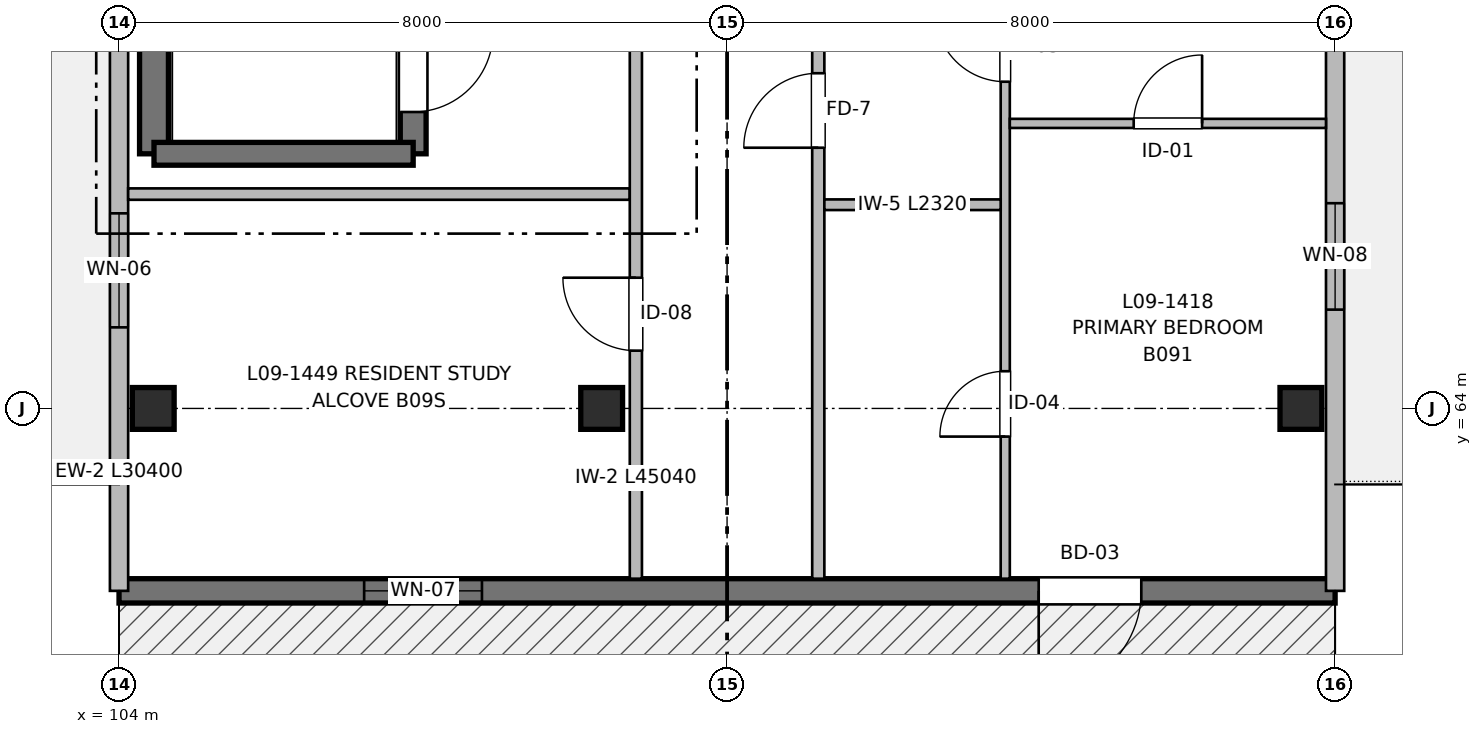
"""IFC4 building model, lengths in metres.
Left out: names, types, materials, properties, quantities, classifications, styles, units other than length and angle.
Written with IfcOpenShell. Run it as: python <this file> out.ifc"""

import sys

from ifc_helpers import new_model, si_unit, direction, frame, frame_2d, origin, origin_2d, place, context, subcontext, project, spatial, rectangle, extrude, element, fill, save


model = new_model("IFC4")
c1 = context("Model", 3, precision=1e-05, world=origin(), true_north=direction((0.0, 1.0)))
c2 = subcontext(c1, "Body", "Model", "MODEL_VIEW")
j1 = project(units=[si_unit("LENGTHUNIT", "METRE"), si_unit("PLANEANGLEUNIT", "RADIAN")], contexts=[c1])
p1 = place(None, origin())
s1 = spatial("IfcSite", under=j1, at=p1, CompositionType="ELEMENT")
p2 = place(p1, origin())
s2 = spatial("IfcBuilding", under=s1, at=p2, CompositionType="ELEMENT")
p3 = place(p2, frame((0.0, 0.0, 29.76)))
s3 = spatial("IfcBuildingStorey", under=s2, at=p3, CompositionType="ELEMENT", Elevation=29.76)
for number, where, z_axis, x_axis in (
    (1, (104.45, 64.0, 0.0), (0.0, 0.0, 1.0), (1.0, 0.0, 0.0)),
    (2, (110.35, 64.0, 0.0), (0.0, 0.0, 1.0), (1.0, 0.0, 0.0)),
    (3, (119.55, 64.0, 0.0), (0.0, 0.0, 1.0), (1.0, 0.0, 0.0)),
):
    element("IfcColumn", number, at=place(p3, frame(where, z_axis=z_axis, x_axis=x_axis)), inside=s3, PredefinedType="COLUMN", context=c2, shape_type="SweptSolid", body=[
        extrude(rectangle(XDim=0.55, YDim=0.55, at=origin_2d()), origin(), (0.0, 0.0, 1.0), 3.2),
    ])
p4 = place(p3, frame((104.46, 67.35, 0.0), z_axis=(0.0, 0.0, 1.0), x_axis=(0.0, 1.0, 0.0)))
e4 = element("IfcWall", 4, at=p4, inside=s3, PredefinedType="SHEAR", context=c2, shape_type="SweptSolid", body=[
    extrude(rectangle(XDim=12.45, YDim=0.38, at=frame_2d((6.225, 0.0))), origin(), (0.0, 0.0, 1.0), 3.2),
])
p5 = place(p4, frame((2.2, 0.0, 0.97)))
e5 = element("IfcOpeningElement", 5, at=p5, cuts=e4, PredefinedType="OPENING", context=c2, shape_type="SweptSolid", body=[
    extrude(rectangle(XDim=0.95, YDim=1.25, at=frame_2d((0.475, 0.625))), frame((0.0, 0.2, 0.0), z_axis=(0.0, -1.0, 0.0), x_axis=(1.0, 0.0, 0.0)), (0.0, 0.0, 1.0), 0.4),
])
p6 = place(p3, frame((107.87, 79.8, 0.0), z_axis=(0.0, 0.0, 1.0), x_axis=(0.0, -1.0, 0.0)))
e6 = element("IfcWall", 6, at=p6, inside=s3, PredefinedType="SHEAR", context=c2, shape_type="SweptSolid", body=[
    extrude(rectangle(XDim=12.45, YDim=0.34, at=frame_2d((6.225, 0.0))), origin(), (0.0, 0.0, 1.0), 3.2),
])
p7 = place(p6, frame((10.85, 0.0, 0.0)))
e7 = element("IfcOpeningElement", 7, at=p7, cuts=e6, PredefinedType="OPENING", context=c2, shape_type="SweptSolid", body=[
    extrude(rectangle(XDim=1.05, YDim=2.15, at=frame_2d((0.525, 1.075))), frame((0.0, 0.18, 0.0), z_axis=(0.0, -1.0, 0.0), x_axis=(1.0, 0.0, 0.0)), (0.0, 0.0, 1.0), 0.36),
])
p8 = place(p3, frame((107.87, 67.35, 0.0), z_axis=(0.0, 0.0, 1.0), x_axis=(-1.0, 0.0, 0.0)))
e8 = element("IfcWall", 8, at=p8, inside=s3, PredefinedType="SHEAR", context=c2, shape_type="SweptSolid", body=[
    extrude(rectangle(XDim=3.41, YDim=0.3, at=frame_2d((1.705, 0.0))), origin(), (0.0, 0.0, 1.0), 3.2),
])
p9 = place(p3, frame((120.0, 61.6, 0.0), z_axis=(0.0, 0.0, 1.0), x_axis=(-1.0, 0.0, 0.0)))
e9 = element("IfcWall", 9, at=p9, inside=s3, PredefinedType="SHEAR", context=c2, shape_type="SweptSolid", body=[
    extrude(rectangle(XDim=16.0, YDim=0.32, at=frame_2d((8.0, 0.0))), origin(), (0.0, 0.0, 1.0), 2.98),
])
p10 = place(p9, frame((2.55, 0.0, 0.0)))
e10 = element("IfcOpeningElement", 10, at=p10, cuts=e9, PredefinedType="OPENING", context=c2, shape_type="SweptSolid", body=[
    extrude(rectangle(XDim=1.35, YDim=2.2, at=frame_2d((0.675, 1.1))), frame((0.0, 0.17, 0.0), z_axis=(0.0, -1.0, 0.0), x_axis=(1.0, 0.0, 0.0)), (0.0, 0.0, 1.0), 0.34),
])
p11 = place(p9, frame((11.225, 0.0, 0.82)))
e11 = element("IfcOpeningElement", 11, at=p11, cuts=e9, PredefinedType="OPENING", context=c2, shape_type="SweptSolid", body=[
    extrude(rectangle(XDim=1.55, YDim=1.4, at=frame_2d((0.775, 0.7))), frame((0.0, 0.17, 0.0), z_axis=(0.0, -1.0, 0.0), x_axis=(1.0, 0.0, 0.0)), (0.0, 0.0, 1.0), 0.34),
])
p12 = place(p3, frame((120.0, 88.0, 0.0), z_axis=(0.0, 0.0, 1.0), x_axis=(0.0, -1.0, 0.0)))
e12 = element("IfcWall", 12, at=p12, inside=s3, PredefinedType="SOLIDWALL", context=c2, shape_type="SweptSolid", body=[
    extrude(rectangle(XDim=26.4, YDim=0.24, at=frame_2d((13.2, 0.0))), origin(), (0.0, 0.0, 1.0), 2.98),
])
p13 = place(p12, frame((3.8, 0.0, 0.0)))
e13 = element("IfcOpeningElement", 13, at=p13, cuts=e12, PredefinedType="OPENING", context=c2, shape_type="SweptSolid", body=[
    extrude(rectangle(XDim=1.2, YDim=2.2, at=frame_2d((0.6, 1.1))), frame((0.0, 0.13, 0.0), z_axis=(0.0, -1.0, 0.0), x_axis=(1.0, 0.0, 0.0)), (0.0, 0.0, 1.0), 0.26),
])
p14 = place(p12, frame((8.7, 0.0, 0.57)))
e14 = element("IfcOpeningElement", 14, at=p14, cuts=e12, PredefinedType="OPENING", context=c2, shape_type="SweptSolid", body=[
    extrude(rectangle(XDim=2.3, YDim=1.65, at=frame_2d((1.15, 0.825))), frame((0.0, 0.13, 0.0), z_axis=(0.0, -1.0, 0.0), x_axis=(1.0, 0.0, 0.0)), (0.0, 0.0, 1.0), 0.26),
])
p15 = place(p12, frame((12.425, 0.0, 0.82)))
e15 = element("IfcOpeningElement", 15, at=p15, cuts=e12, PredefinedType="OPENING", context=c2, shape_type="SweptSolid", body=[
    extrude(rectangle(XDim=1.55, YDim=1.4, at=frame_2d((0.775, 0.7))), frame((0.0, 0.13, 0.0), z_axis=(0.0, -1.0, 0.0), x_axis=(1.0, 0.0, 0.0)), (0.0, 0.0, 1.0), 0.26),
])
p16 = place(p12, frame((21.3, 0.0, 0.87)))
e16 = element("IfcOpeningElement", 16, at=p16, cuts=e12, PredefinedType="OPENING", context=c2, shape_type="SweptSolid", body=[
    extrude(rectangle(XDim=1.4, YDim=1.35, at=frame_2d((0.7, 0.675))), frame((0.0, 0.13, 0.0), z_axis=(0.0, -1.0, 0.0), x_axis=(1.0, 0.0, 0.0)), (0.0, 0.0, 1.0), 0.26),
])
p17 = place(p12, frame((17.12, 0.0, 0.82)))
e17 = element("IfcOpeningElement", 17, at=p17, cuts=e12, PredefinedType="OPENING", context=c2, shape_type="SweptSolid", body=[
    extrude(rectangle(XDim=1.5, YDim=1.4, at=frame_2d((0.75, 0.7))), frame((0.0, 0.13, 0.0), z_axis=(0.0, -1.0, 0.0), x_axis=(1.0, 0.0, 0.0)), (0.0, 0.0, 1.0), 0.26),
])
p18 = place(p12, frame((0.725, 0.0, 0.82)))
e18 = element("IfcOpeningElement", 18, at=p18, cuts=e12, PredefinedType="OPENING", context=c2, shape_type="SweptSolid", body=[
    extrude(rectangle(XDim=1.5, YDim=1.4, at=frame_2d((0.75, 0.7))), frame((0.0, 0.13, 0.0), z_axis=(0.0, -1.0, 0.0), x_axis=(1.0, 0.0, 0.0)), (0.0, 0.0, 1.0), 0.26),
])
p19 = place(p3, frame((104.0, 61.6, 0.0), z_axis=(0.0, 0.0, 1.0), x_axis=(0.0, 1.0, 0.0)))
e19 = element("IfcWall", 19, at=p19, inside=s3, PredefinedType="SOLIDWALL", context=c2, shape_type="SweptSolid", body=[
    extrude(rectangle(XDim=30.4, YDim=0.24, at=frame_2d((15.2, 0.0))), origin(), (0.0, 0.0, 1.0), 2.98),
])
p20 = place(p19, frame((3.467, 0.0, 0.82)))
e20 = element("IfcOpeningElement", 20, at=p20, cuts=e19, PredefinedType="OPENING", context=c2, shape_type="SweptSolid", body=[
    extrude(rectangle(XDim=1.5, YDim=1.4, at=frame_2d((0.75, 0.7))), frame((0.0, 0.13, 0.0), z_axis=(0.0, -1.0, 0.0), x_axis=(1.0, 0.0, 0.0)), (0.0, 0.0, 1.0), 0.26),
])
p21 = place(p19, frame((14.425, 0.0, 0.82)))
e21 = element("IfcOpeningElement", 21, at=p21, cuts=e19, PredefinedType="OPENING", context=c2, shape_type="SweptSolid", body=[
    extrude(rectangle(XDim=1.55, YDim=1.4, at=frame_2d((0.775, 0.7))), frame((0.0, 0.13, 0.0), z_axis=(0.0, -1.0, 0.0), x_axis=(1.0, 0.0, 0.0)), (0.0, 0.0, 1.0), 0.26),
])
p22 = place(p19, frame((24.333, 0.0, 0.0)))
e22 = element("IfcOpeningElement", 22, at=p22, cuts=e19, PredefinedType="OPENING", context=c2, shape_type="SweptSolid", body=[
    extrude(rectangle(XDim=1.2, YDim=2.2, at=frame_2d((0.6, 1.1))), frame((0.0, 0.13, 0.0), z_axis=(0.0, -1.0, 0.0), x_axis=(1.0, 0.0, 0.0)), (0.0, 0.0, 1.0), 0.26),
])
p23 = place(p19, frame((26.633, 0.0, 0.72)))
e23 = element("IfcOpeningElement", 23, at=p23, cuts=e19, PredefinedType="OPENING", context=c2, shape_type="SweptSolid", body=[
    extrude(rectangle(XDim=1.95, YDim=1.5, at=frame_2d((0.975, 0.75))), frame((0.0, 0.13, 0.0), z_axis=(0.0, -1.0, 0.0), x_axis=(1.0, 0.0, 0.0)), (0.0, 0.0, 1.0), 0.26),
])
p24 = place(p3, frame((104.12, 66.82, 0.0), z_axis=(0.0, 0.0, 1.0), x_axis=(1.0, 0.0, 0.0)))
e24 = element("IfcWall", 24, at=p24, inside=s3, PredefinedType="PARTITIONING", context=c2, shape_type="SweptSolid", body=[
    extrude(rectangle(XDim=6.6, YDim=0.15, at=frame_2d((3.3, 0.0))), origin(), (0.0, 0.0, 1.0), 2.935),
])
p25 = place(p3, frame((110.8, 61.76, 0.0), z_axis=(0.0, 0.0, 1.0), x_axis=(0.0, 1.0, 0.0)))
e25 = element("IfcWall", 25, at=p25, inside=s3, PredefinedType="PARTITIONING", context=c2, shape_type="SweptSolid", body=[
    extrude(rectangle(XDim=45.04, YDim=0.16, at=frame_2d((22.52, 0.0))), origin(), (0.0, 0.0, 1.0), 2.935),
])
p26 = place(p25, frame((7.24, 0.0, 0.0)))
e26 = element("IfcOpeningElement", 26, at=p26, cuts=e25, PredefinedType="OPENING", context=c2, shape_type="SweptSolid", body=[
    extrude(rectangle(XDim=1.1, YDim=2.15, at=frame_2d((0.55, 1.075))), frame((0.0, 0.09, 0.0), z_axis=(0.0, -1.0, 0.0), x_axis=(1.0, 0.0, 0.0)), (0.0, 0.0, 1.0), 0.18),
])
p27 = place(p25, frame((13.64, 0.0, 0.0)))
e27 = element("IfcOpeningElement", 27, at=p27, cuts=e25, PredefinedType="OPENING", context=c2, shape_type="SweptSolid", body=[
    extrude(rectangle(XDim=1.6, YDim=2.15, at=frame_2d((0.8, 1.075))), frame((0.0, 0.09, 0.0), z_axis=(0.0, -1.0, 0.0), x_axis=(1.0, 0.0, 0.0)), (0.0, 0.0, 1.0), 0.18),
])
p28 = place(p25, frame((3.0, 0.0, 0.0)))
e28 = element("IfcOpeningElement", 28, at=p28, cuts=e25, PredefinedType="OPENING", context=c2, shape_type="SweptSolid", body=[
    extrude(rectangle(XDim=0.96, YDim=2.15, at=frame_2d((0.48, 1.075))), frame((0.0, 0.09, 0.0), z_axis=(0.0, -1.0, 0.0), x_axis=(1.0, 0.0, 0.0)), (0.0, 0.0, 1.0), 0.18),
])
p29 = place(p25, frame((27.245, 0.0, 0.0)))
e29 = element("IfcOpeningElement", 29, at=p29, cuts=e25, PredefinedType="OPENING", context=c2, shape_type="SweptSolid", body=[
    extrude(rectangle(XDim=0.98, YDim=2.15, at=frame_2d((0.49, 1.075))), frame((0.0, 0.09, 0.0), z_axis=(0.0, -1.0, 0.0), x_axis=(1.0, 0.0, 0.0)), (0.0, 0.0, 1.0), 0.18),
])
p30 = place(p25, frame((35.055, 0.0, 0.0)))
e30 = element("IfcOpeningElement", 30, at=p30, cuts=e25, PredefinedType="OPENING", context=c2, shape_type="SweptSolid", body=[
    extrude(rectangle(XDim=0.98, YDim=2.15, at=frame_2d((0.49, 1.075))), frame((0.0, 0.09, 0.0), z_axis=(0.0, -1.0, 0.0), x_axis=(1.0, 0.0, 0.0)), (0.0, 0.0, 1.0), 0.18),
])
p31 = place(p3, frame((113.2, 61.76, 0.0), z_axis=(0.0, 0.0, 1.0), x_axis=(0.0, 1.0, 0.0)))
e31 = element("IfcWall", 31, at=p31, inside=s3, PredefinedType="PARTITIONING", context=c2, shape_type="SweptSolid", body=[
    extrude(rectangle(XDim=45.04, YDim=0.16, at=frame_2d((22.52, 0.0))), origin(), (0.0, 0.0, 1.0), 2.935),
])
p32 = place(p31, frame((5.67, 0.0, 0.0)))
e32 = element("IfcOpeningElement", 32, at=p32, cuts=e31, PredefinedType="OPENING", context=c2, shape_type="SweptSolid", body=[
    extrude(rectangle(XDim=0.98, YDim=2.15, at=frame_2d((0.49, 1.075))), frame((0.0, 0.09, 0.0), z_axis=(0.0, -1.0, 0.0), x_axis=(1.0, 0.0, 0.0)), (0.0, 0.0, 1.0), 0.18),
])
p33 = place(p31, frame((17.34, 0.0, 0.0)))
e33 = element("IfcOpeningElement", 33, at=p33, cuts=e31, PredefinedType="OPENING", context=c2, shape_type="SweptSolid", body=[
    extrude(rectangle(XDim=1.02, YDim=2.15, at=frame_2d((0.51, 1.075))), frame((0.0, 0.09, 0.0), z_axis=(0.0, -1.0, 0.0), x_axis=(1.0, 0.0, 0.0)), (0.0, 0.0, 1.0), 0.18),
])
p34 = place(p31, frame((29.51, 0.0, 0.0)))
e34 = element("IfcOpeningElement", 34, at=p34, cuts=e31, PredefinedType="OPENING", context=c2, shape_type="SweptSolid", body=[
    extrude(rectangle(XDim=0.98, YDim=2.15, at=frame_2d((0.49, 1.075))), frame((0.0, 0.09, 0.0), z_axis=(0.0, -1.0, 0.0), x_axis=(1.0, 0.0, 0.0)), (0.0, 0.0, 1.0), 0.18),
])
p35 = place(p31, frame((40.42, 0.0, 0.0)))
e35 = element("IfcOpeningElement", 35, at=p35, cuts=e31, PredefinedType="OPENING", context=c2, shape_type="SweptSolid", body=[
    extrude(rectangle(XDim=0.98, YDim=2.15, at=frame_2d((0.49, 1.075))), frame((0.0, 0.09, 0.0), z_axis=(0.0, -1.0, 0.0), x_axis=(1.0, 0.0, 0.0)), (0.0, 0.0, 1.0), 0.18),
])
p36 = place(p3, frame((115.66, 61.76, 0.0), z_axis=(0.0, 0.0, 1.0), x_axis=(0.0, 1.0, 0.0)))
e36 = element("IfcWall", 36, at=p36, inside=s3, PredefinedType="PARTITIONING", context=c2, shape_type="SweptSolid", body=[
    extrude(rectangle(XDim=10.7, YDim=0.12, at=frame_2d((5.35, 0.0))), origin(), (0.0, 0.0, 1.0), 2.935),
])
p37 = place(p36, frame((1.87, 0.0, 0.0)))
e37 = element("IfcOpeningElement", 37, at=p37, cuts=e36, PredefinedType="OPENING", context=c2, shape_type="SweptSolid", body=[
    extrude(rectangle(XDim=0.86, YDim=2.1, at=frame_2d((0.43, 1.05))), frame((0.0, 0.07, 0.0), z_axis=(0.0, -1.0, 0.0), x_axis=(1.0, 0.0, 0.0)), (0.0, 0.0, 1.0), 0.14),
])
p38 = place(p36, frame((6.538, 0.0, 0.0)))
e38 = element("IfcOpeningElement", 38, at=p38, cuts=e36, PredefinedType="OPENING", context=c2, shape_type="SweptSolid", body=[
    extrude(rectangle(XDim=0.92, YDim=2.1, at=frame_2d((0.46, 1.05))), frame((0.0, 0.07, 0.0), z_axis=(0.0, -1.0, 0.0), x_axis=(1.0, 0.0, 0.0)), (0.0, 0.0, 1.0), 0.14),
])
p39 = place(p3, frame((113.28, 66.68, 0.0), z_axis=(0.0, 0.0, 1.0), x_axis=(1.0, 0.0, 0.0)))
e39 = element("IfcWall", 39, at=p39, inside=s3, PredefinedType="PARTITIONING", context=c2, shape_type="SweptSolid", body=[
    extrude(rectangle(XDim=2.32, YDim=0.14, at=frame_2d((1.16, 0.0))), origin(), (0.0, 0.0, 1.0), 2.935),
])
p40 = place(p3, frame((115.72, 67.75, 0.0), z_axis=(0.0, 0.0, 1.0), x_axis=(1.0, 0.0, 0.0)))
e40 = element("IfcWall", 40, at=p40, inside=s3, PredefinedType="PARTITIONING", context=c2, shape_type="SweptSolid", body=[
    extrude(rectangle(XDim=4.16, YDim=0.12, at=frame_2d((2.08, 0.0))), origin(), (0.0, 0.0, 1.0), 2.935),
])
p41 = place(p40, frame((1.63, 0.0, 0.0)))
e41 = element("IfcOpeningElement", 41, at=p41, cuts=e40, PredefinedType="OPENING", context=c2, shape_type="SweptSolid", body=[
    extrude(rectangle(XDim=0.9, YDim=2.1, at=frame_2d((0.45, 1.05))), frame((0.0, 0.07, 0.0), z_axis=(0.0, -1.0, 0.0), x_axis=(1.0, 0.0, 0.0)), (0.0, 0.0, 1.0), 0.14),
])
p42 = place(p7, origin())
e42 = element("IfcDoor", 42, at=p42, inside=s3, OperationType="SINGLE_SWING_LEFT", PredefinedType="DOOR", context=c2, shape_type="SweptSolid", body=[
    extrude(rectangle(XDim=1.05, YDim=2.15, at=frame_2d((0.525, 1.075))), frame((0.0, 0.025, 0.0), z_axis=(0.0, -1.0, 0.0), x_axis=(1.0, 0.0, 0.0)), (0.0, 0.0, 1.0), 0.05),
])
fill(e7, e42)
p43 = place(p10, origin())
e43 = element("IfcDoor", 43, at=p43, inside=s3, OperationType="SINGLE_SWING_RIGHT", PredefinedType="DOOR", context=c2, shape_type="SweptSolid", body=[
    extrude(rectangle(XDim=1.35, YDim=2.2, at=frame_2d((0.675, 1.1))), frame((0.0, 0.025, 0.0), z_axis=(0.0, -1.0, 0.0), x_axis=(1.0, 0.0, 0.0)), (0.0, 0.0, 1.0), 0.05),
])
fill(e10, e43)
p44 = place(p11, origin())
e44 = element("IfcWindow", 44, at=p44, inside=s3, PartitioningType="SINGLE_PANEL", PredefinedType="WINDOW", context=c2, shape_type="SweptSolid", body=[
    extrude(rectangle(XDim=1.55, YDim=1.4, at=frame_2d((0.775, 0.7))), frame((0.0, 0.03, 0.0), z_axis=(0.0, -1.0, 0.0), x_axis=(1.0, 0.0, 0.0)), (0.0, 0.0, 1.0), 0.06),
])
fill(e11, e44)
p45 = place(p16, origin())
e45 = element("IfcWindow", 45, at=p45, inside=s3, PartitioningType="SINGLE_PANEL", PredefinedType="WINDOW", context=c2, shape_type="SweptSolid", body=[
    extrude(rectangle(XDim=1.4, YDim=1.35, at=frame_2d((0.7, 0.675))), frame((0.0, 0.03, 0.0), z_axis=(0.0, -1.0, 0.0), x_axis=(1.0, 0.0, 0.0)), (0.0, 0.0, 1.0), 0.06),
])
fill(e16, e45)
p46 = place(p20, origin())
e46 = element("IfcWindow", 46, at=p46, inside=s3, PartitioningType="SINGLE_PANEL", PredefinedType="WINDOW", context=c2, shape_type="SweptSolid", body=[
    extrude(rectangle(XDim=1.5, YDim=1.4, at=frame_2d((0.75, 0.7))), frame((0.0, 0.03, 0.0), z_axis=(0.0, -1.0, 0.0), x_axis=(1.0, 0.0, 0.0)), (0.0, 0.0, 1.0), 0.06),
])
fill(e20, e46)
p47 = place(p37, origin())
e47 = element("IfcDoor", 47, at=p47, inside=s3, OperationType="SINGLE_SWING_LEFT", PredefinedType="DOOR", context=c2, shape_type="SweptSolid", body=[
    extrude(rectangle(XDim=0.86, YDim=2.1, at=frame_2d((0.43, 1.05))), frame((0.0, 0.025, 0.0), z_axis=(0.0, -1.0, 0.0), x_axis=(1.0, 0.0, 0.0)), (0.0, 0.0, 1.0), 0.05),
])
fill(e37, e47)
p48 = place(p38, origin())
e48 = element("IfcDoor", 48, at=p48, inside=s3, OperationType="SINGLE_SWING_RIGHT", PredefinedType="DOOR", context=c2, shape_type="SweptSolid", body=[
    extrude(rectangle(XDim=0.92, YDim=2.1, at=frame_2d((0.46, 1.05))), frame((0.0, 0.025, 0.0), z_axis=(0.0, -1.0, 0.0), x_axis=(1.0, 0.0, 0.0)), (0.0, 0.0, 1.0), 0.05),
])
fill(e38, e48)
p49 = place(p32, origin())
e49 = element("IfcDoor", 49, at=p49, inside=s3, OperationType="SINGLE_SWING_LEFT", PredefinedType="DOOR", context=c2, shape_type="SweptSolid", body=[
    extrude(rectangle(XDim=0.98, YDim=2.15, at=frame_2d((0.49, 1.075))), frame((0.0, 0.025, 0.0), z_axis=(0.0, -1.0, 0.0), x_axis=(1.0, 0.0, 0.0)), (0.0, 0.0, 1.0), 0.05),
])
fill(e32, e49)
p50 = place(p41, origin())
e50 = element("IfcDoor", 50, at=p50, inside=s3, OperationType="SINGLE_SWING_RIGHT", PredefinedType="DOOR", context=c2, shape_type="SweptSolid", body=[
    extrude(rectangle(XDim=0.9, YDim=2.1, at=frame_2d((0.45, 1.05))), frame((0.0, 0.025, 0.0), z_axis=(0.0, -1.0, 0.0), x_axis=(1.0, 0.0, 0.0)), (0.0, 0.0, 1.0), 0.05),
])
fill(e41, e50)
p51 = place(p28, origin())
e51 = element("IfcDoor", 51, at=p51, inside=s3, OperationType="SINGLE_SWING_RIGHT", PredefinedType="DOOR", context=c2, shape_type="SweptSolid", body=[
    extrude(rectangle(XDim=0.96, YDim=2.15, at=frame_2d((0.48, 1.075))), frame((0.0, 0.025, 0.0), z_axis=(0.0, -1.0, 0.0), x_axis=(1.0, 0.0, 0.0)), (0.0, 0.0, 1.0), 0.05),
])
fill(e28, e51)
save(model, sys.argv[1])
